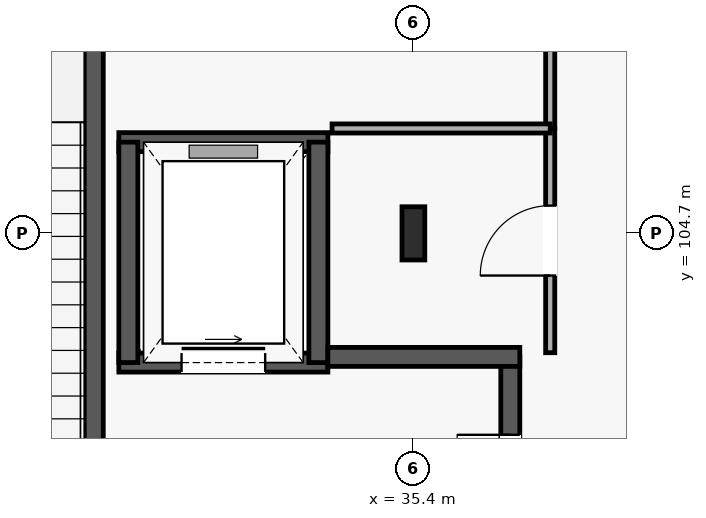
"""IFC4 building model, lengths in metres.
Left out: names, types, materials, properties, quantities, classifications, styles, units other than length and angle.
Written with IfcOpenShell. Run it as: python <this file> out.ifc"""

import sys

from ifc_helpers import new_model, si_unit, direction, frame, frame_2d, origin, origin_2d, place, context, subcontext, project, spatial, rectangle, i_section, extrude, element, fill, save


model = new_model("IFC4")
c1 = context("Model", 3, precision=1e-05, world=origin(), true_north=direction((0.0, 1.0)))
c2 = subcontext(c1, "Body", "Model", "MODEL_VIEW")
j1 = project(units=[si_unit("LENGTHUNIT", "METRE"), si_unit("PLANEANGLEUNIT", "RADIAN")], contexts=[c1])
p1 = place(None, origin())
s1 = spatial("IfcSite", under=j1, at=p1, CompositionType="ELEMENT")
p2 = place(p1, origin())
s2 = spatial("IfcBuilding", under=s1, at=p2, CompositionType="ELEMENT")
p3 = place(p2, frame((0.0, 0.0, 15.0)))
s3 = spatial("IfcBuildingStorey", under=s2, at=p3, CompositionType="ELEMENT", Elevation=15.0)
p4 = place(p3, frame((35.4, 104.7, 0.0), z_axis=(0.0, 0.0, 1.0), x_axis=(1.0, 0.0, 0.0)))
e1 = element("IfcColumn", 1, at=p4, inside=s3, PredefinedType="COLUMN", context=c2, shape_type="SweptSolid", body=[
    extrude(i_section(OverallWidth=0.3, OverallDepth=0.7, WebThickness=0.017, FlangeThickness=0.032, at=origin_2d()), origin(), (0.0, 0.0, 1.0), 4.8),
])
p5 = place(p3, frame((31.195, 99.475, 0.0), z_axis=(0.0, 0.0, 1.0), x_axis=(0.0, 1.0, 0.0)))
e2 = element("IfcWall", 2, at=p5, inside=s3, PredefinedType="SHEAR", context=c2, shape_type="SweptSolid", body=[
    extrude(rectangle(XDim=10.85, YDim=0.25, at=frame_2d((5.425, 0.0))), origin(), (0.0, 0.0, 1.0), 4.5),
])
p6 = place(p5, frame((0.52, 0.0, 0.0)))
e3 = element("IfcOpeningElement", 3, at=p6, cuts=e2, PredefinedType="OPENING", context=c2, shape_type="SweptSolid", body=[
    extrude(rectangle(XDim=1.4, YDim=2.15, at=frame_2d((0.7, 1.075))), frame((0.0, 0.135, 0.0), z_axis=(0.0, -1.0, 0.0), x_axis=(1.0, 0.0, 0.0)), (0.0, 0.0, 1.0), 0.27),
])
p7 = place(p3, frame((31.525, 103.0, 0.0), z_axis=(0.0, 0.0, 1.0), x_axis=(1.0, 0.0, 0.0)))
e4 = element("IfcWall", 4, at=p7, inside=s3, PredefinedType="SHEAR", context=c2, shape_type="SweptSolid", body=[
    extrude(rectangle(XDim=2.75, YDim=0.25, at=frame_2d((1.375, 0.0))), origin(), (0.0, 0.0, 1.0), 4.5),
])
p8 = place(p7, frame((0.825, 0.0, 0.0)))
e5 = element("IfcOpeningElement", 5, at=p8, cuts=e4, PredefinedType="OPENING", context=c2, shape_type="SweptSolid", body=[
    extrude(rectangle(XDim=1.1, YDim=2.15, at=frame_2d((0.55, 1.075))), frame((0.0, 0.135, 0.0), z_axis=(0.0, -1.0, 0.0), x_axis=(1.0, 0.0, 0.0)), (0.0, 0.0, 1.0), 0.27),
])
p9 = place(p3, frame((34.275, 105.9, 0.0), z_axis=(0.0, 0.0, 1.0), x_axis=(-1.0, 0.0, 0.0)))
e6 = element("IfcWall", 6, at=p9, inside=s3, PredefinedType="SHEAR", context=c2, shape_type="SweptSolid", body=[
    extrude(rectangle(XDim=2.75, YDim=0.25, at=frame_2d((1.375, 0.0))), origin(), (0.0, 0.0, 1.0), 4.5),
])
for number, where, z_axis, x_axis in (
    (7, (31.65, 105.9, 0.0), (0.0, 0.0, 1.0), (0.0, -1.0, 0.0)),
    (8, (34.15, 103.0, 0.0), (0.0, 0.0, 1.0), (0.0, 1.0, 0.0)),
):
    element("IfcWall", number, at=place(p3, frame(where, z_axis=z_axis, x_axis=x_axis)), inside=s3, PredefinedType="SHEAR", context=c2, shape_type="SweptSolid", body=[
        extrude(rectangle(XDim=2.9, YDim=0.25, at=frame_2d((1.45, 0.0))), origin(), (0.0, 0.0, 1.0), 4.5),
    ])
p10 = place(p3, frame((36.675, 99.625, 0.0), z_axis=(0.0, 0.0, 1.0), x_axis=(0.0, 1.0, 0.0)))
e9 = element("IfcWall", 9, at=p10, inside=s3, PredefinedType="SHEAR", context=c2, shape_type="SweptSolid", body=[
    extrude(rectangle(XDim=3.45, YDim=0.25, at=frame_2d((1.725, 0.0))), origin(), (0.0, 0.0, 1.0), 4.5),
])
p11 = place(p10, frame((1.025, 0.0, 0.0)))
e10 = element("IfcOpeningElement", 10, at=p11, cuts=e9, PredefinedType="OPENING", context=c2, shape_type="SweptSolid", body=[
    extrude(rectangle(XDim=1.4, YDim=2.15, at=frame_2d((0.7, 1.075))), frame((0.0, 0.135, 0.0), z_axis=(0.0, -1.0, 0.0), x_axis=(1.0, 0.0, 0.0)), (0.0, 0.0, 1.0), 0.27),
])
p12 = place(p3, frame((34.275, 103.075, 0.0), z_axis=(0.0, 0.0, 1.0), x_axis=(1.0, 0.0, 0.0)))
e11 = element("IfcWall", 11, at=p12, inside=s3, PredefinedType="SHEAR", context=c2, shape_type="SweptSolid", body=[
    extrude(rectangle(XDim=2.525, YDim=0.25, at=frame_2d((1.263, 0.0))), origin(), (0.0, 0.0, 1.0), 4.5),
])
p13 = place(p3, frame((37.2, 106.08, 0.0), z_axis=(0.0, 0.0, 1.0), x_axis=(0.0, 1.0, 0.0)))
e12 = element("IfcWall", 12, at=p13, inside=s3, PredefinedType="PARTITIONING", context=c2, shape_type="SweptSolid", body=[
    extrude(rectangle(XDim=4.45, YDim=0.12, at=frame_2d((2.225, 0.0))), origin(), (0.0, 0.0, 1.0), 4.5),
])
p14 = place(p13, frame((1.385, 0.0, 0.0)))
e13 = element("IfcOpeningElement", 13, at=p14, cuts=e12, PredefinedType="OPENING", context=c2, shape_type="SweptSolid", body=[
    extrude(rectangle(XDim=1.68, YDim=2.25, at=frame_2d((0.84, 1.125))), frame((0.0, 0.07, 0.0), z_axis=(0.0, -1.0, 0.0), x_axis=(1.0, 0.0, 0.0)), (0.0, 0.0, 1.0), 0.14),
])
p15 = place(p3, frame((37.2, 103.13, 0.0), z_axis=(0.0, 0.0, 1.0), x_axis=(0.0, 1.0, 0.0)))
e14 = element("IfcWall", 14, at=p15, inside=s3, PredefinedType="PARTITIONING", context=c2, shape_type="SweptSolid", body=[
    extrude(rectangle(XDim=2.95, YDim=0.12, at=frame_2d((1.475, 0.0))), origin(), (0.0, 0.0, 1.0), 4.5),
])
p16 = place(p15, frame((1.015, 0.0, 0.0)))
e15 = element("IfcOpeningElement", 15, at=p16, cuts=e14, PredefinedType="OPENING", context=c2, shape_type="SweptSolid", body=[
    extrude(rectangle(XDim=0.92, YDim=2.1, at=frame_2d((0.46, 1.05))), frame((0.0, 0.07, 0.0), z_axis=(0.0, -1.0, 0.0), x_axis=(1.0, 0.0, 0.0)), (0.0, 0.0, 1.0), 0.14),
])
p17 = place(p3, frame((37.2, 106.08, 0.0), z_axis=(0.0, 0.0, 1.0), x_axis=(-1.0, 0.0, 0.0)))
e16 = element("IfcWall", 16, at=p17, inside=s3, PredefinedType="PARTITIONING", context=c2, shape_type="SweptSolid", body=[
    extrude(rectangle(XDim=2.87, YDim=0.12, at=frame_2d((1.435, 0.0))), origin(), (0.0, 0.0, 1.0), 4.5),
])
p18 = place(p8, origin())
e17 = element("IfcDoor", 17, at=p18, inside=s3, OperationType="SLIDING_TO_LEFT", PredefinedType="DOOR", context=c2, shape_type="SweptSolid", body=[
    extrude(rectangle(XDim=1.1, YDim=2.15, at=frame_2d((0.55, 1.075))), frame((0.0, 0.025, 0.0), z_axis=(0.0, -1.0, 0.0), x_axis=(1.0, 0.0, 0.0)), (0.0, 0.0, 1.0), 0.05),
])
fill(e5, e17)
p19 = place(p11, origin())
e18 = element("IfcDoor", 18, at=p19, inside=s3, OperationType="DOUBLE_DOOR_SINGLE_SWING", PredefinedType="DOOR", context=c2, shape_type="SweptSolid", body=[
    extrude(rectangle(XDim=1.4, YDim=2.15, at=frame_2d((0.7, 1.075))), frame((0.0, 0.025, 0.0), z_axis=(0.0, -1.0, 0.0), x_axis=(1.0, 0.0, 0.0)), (0.0, 0.0, 1.0), 0.05),
])
fill(e10, e18)
p20 = place(p16, origin())
e19 = element("IfcDoor", 19, at=p20, inside=s3, OperationType="SINGLE_SWING_LEFT", PredefinedType="DOOR", context=c2, shape_type="SweptSolid", body=[
    extrude(rectangle(XDim=0.92, YDim=2.1, at=frame_2d((0.46, 1.05))), frame((0.0, 0.025, 0.0), z_axis=(0.0, -1.0, 0.0), x_axis=(1.0, 0.0, 0.0)), (0.0, 0.0, 1.0), 0.05),
])
fill(e15, e19)
save(model, sys.argv[1])
